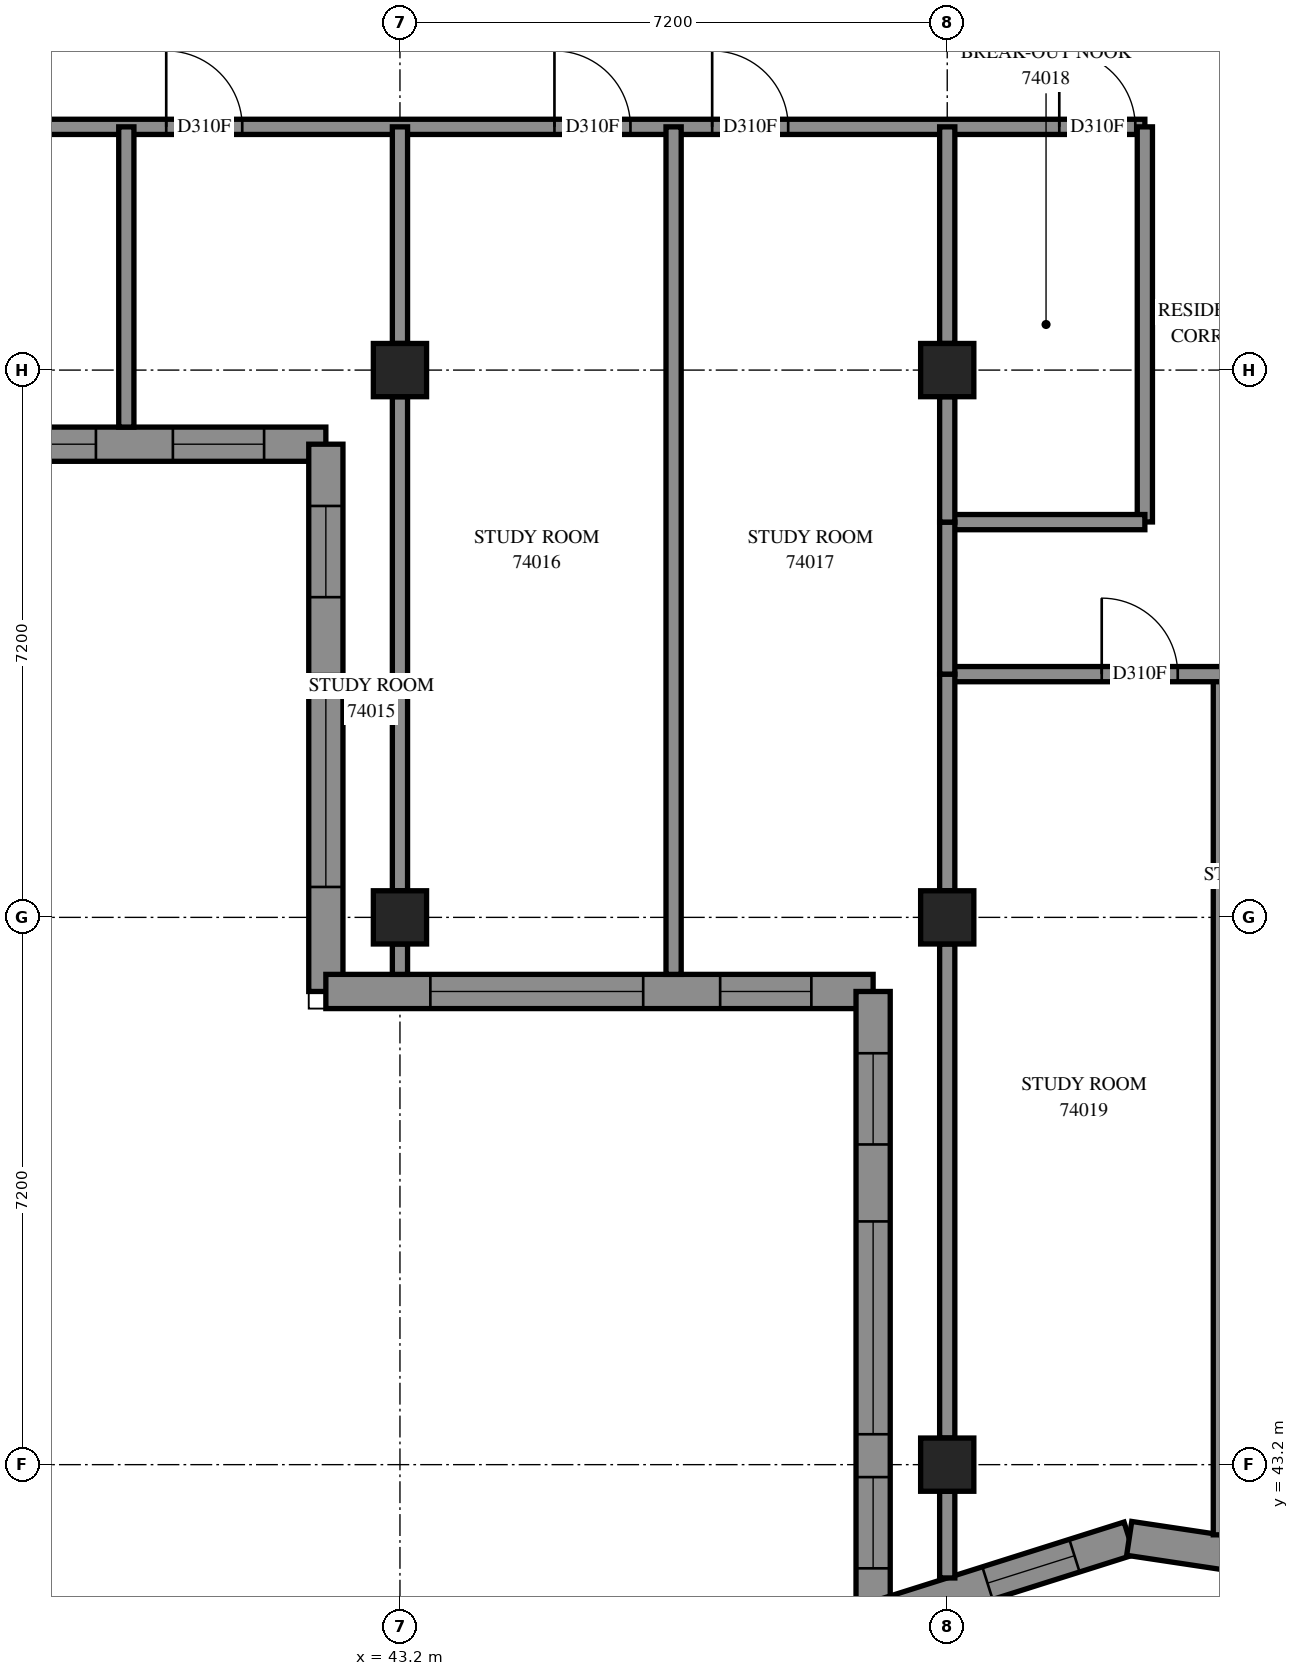
"""IFC4 building model, lengths in metres.
Left out: names, types, materials, properties, quantities, classifications, styles, units other than length and angle.
Written with IfcOpenShell. Run it as: python <this file> out.ifc"""

import sys

from ifc_helpers import new_model, si_unit, direction, frame, frame_2d, origin, origin_2d, place, context, subcontext, project, spatial, polyline, rectangle, outline, extrude, element, fill, save


model = new_model("IFC4")
c1 = context("Model", 3, precision=1e-05, world=origin(), true_north=direction((0.0, 1.0)))
c2 = subcontext(c1, "Body", "Model", "MODEL_VIEW")
j1 = project(units=[si_unit("LENGTHUNIT", "METRE"), si_unit("PLANEANGLEUNIT", "RADIAN")], contexts=[c1])
p1 = place(None, origin())
s1 = spatial("IfcSite", under=j1, at=p1, CompositionType="ELEMENT")
p2 = place(p1, origin())
s2 = spatial("IfcBuilding", under=s1, at=p2, CompositionType="ELEMENT")
p3 = place(p2, frame((0.0, 0.0, 271.0)))
s3 = spatial("IfcBuildingStorey", under=s2, at=p3, CompositionType="ELEMENT", Elevation=271.0)
for number, where, z_axis, x_axis in (
    (1, (43.2, 50.4, 0.0), (0.0, 0.0, 1.0), (1.0, 0.0, 0.0)),
    (2, (43.2, 57.6, 0.0), (0.0, 0.0, 1.0), (1.0, 0.0, 0.0)),
    (3, (50.4, 43.2, 0.0), (0.0, 0.0, 1.0), (1.0, 0.0, 0.0)),
    (4, (50.4, 50.4, 0.0), (0.0, 0.0, 1.0), (1.0, 0.0, 0.0)),
    (5, (50.4, 57.6, 0.0), (0.0, 0.0, 1.0), (1.0, 0.0, 0.0)),
):
    element("IfcColumn", number, at=place(p3, frame(where, z_axis=z_axis, x_axis=x_axis)), inside=s3, PredefinedType="COLUMN", context=c2, shape_type="SweptSolid", body=[
        extrude(rectangle(XDim=0.7, YDim=0.7, at=origin_2d()), origin(), (0.0, 0.0, 1.0), 3.1),
    ])
p4 = place(p3, frame((35.025, 56.625, 0.0), z_axis=(0.0, 0.0, 1.0), x_axis=(1.0, 0.0, 0.0)))
e6 = element("IfcWall", 6, at=p4, inside=s3, PredefinedType="SOLIDWALL", context=c2, shape_type="SweptSolid", body=[
    extrude(outline(polyline([(-0.225, -0.225), (6.975, -0.225), (7.425, 0.225), (0.225, 0.225), (-0.225, -0.225)])), origin(), (0.0, 0.0, 1.0), 3.1),
])
p5 = place(p4, frame((1.375, 0.0, 0.45)))
e7 = element("IfcOpeningElement", 7, at=p5, cuts=e6, PredefinedType="OPENING", context=c2, shape_type="SweptSolid", body=[
    extrude(rectangle(XDim=2.8, YDim=2.55, at=frame_2d((1.4, 1.275))), frame((0.0, 0.235, 0.0), z_axis=(0.0, -1.0, 0.0), x_axis=(1.0, 0.0, 0.0)), (0.0, 0.0, 1.0), 0.47),
])
p6 = place(p4, frame((5.188, 0.0, 0.45)))
e8 = element("IfcOpeningElement", 8, at=p6, cuts=e6, PredefinedType="OPENING", context=c2, shape_type="SweptSolid", body=[
    extrude(rectangle(XDim=1.2, YDim=2.55, at=frame_2d((0.6, 1.275))), frame((0.0, 0.235, 0.0), z_axis=(0.0, -1.0, 0.0), x_axis=(1.0, 0.0, 0.0)), (0.0, 0.0, 1.0), 0.47),
])
p7 = place(p3, frame((42.225, 56.625, 0.0), z_axis=(0.0, 0.0, 1.0), x_axis=(0.0, -1.0, 0.0)))
e9 = element("IfcWall", 9, at=p7, inside=s3, PredefinedType="SOLIDWALL", context=c2, shape_type="SweptSolid", body=[
    extrude(outline(polyline([(0.225, -0.225), (7.425, -0.225), (6.975, 0.225), (-0.225, 0.225), (0.225, -0.225)])), origin(), (0.0, 0.0, 1.0), 3.1),
])
p8 = place(p7, frame((3.025, 0.0, 0.45)))
e10 = element("IfcOpeningElement", 10, at=p8, cuts=e9, PredefinedType="OPENING", context=c2, shape_type="SweptSolid", body=[
    extrude(rectangle(XDim=2.8, YDim=2.55, at=frame_2d((1.4, 1.275))), frame((0.0, 0.235, 0.0), z_axis=(0.0, -1.0, 0.0), x_axis=(1.0, 0.0, 0.0)), (0.0, 0.0, 1.0), 0.47),
])
p9 = place(p7, frame((0.812, 0.0, 0.45)))
e11 = element("IfcOpeningElement", 11, at=p9, cuts=e9, PredefinedType="OPENING", context=c2, shape_type="SweptSolid", body=[
    extrude(rectangle(XDim=1.2, YDim=2.55, at=frame_2d((0.6, 1.275))), frame((0.0, 0.235, 0.0), z_axis=(0.0, -1.0, 0.0), x_axis=(1.0, 0.0, 0.0)), (0.0, 0.0, 1.0), 0.47),
])
p10 = place(p3, frame((42.225, 49.425, 0.0), z_axis=(0.0, 0.0, 1.0), x_axis=(1.0, 0.0, 0.0)))
e12 = element("IfcWall", 12, at=p10, inside=s3, PredefinedType="SOLIDWALL", context=c2, shape_type="SweptSolid", body=[
    extrude(outline(polyline([(-0.225, -0.225), (6.975, -0.225), (7.425, 0.225), (0.225, 0.225), (-0.225, -0.225)])), origin(), (0.0, 0.0, 1.0), 3.1),
])
p11 = place(p10, frame((1.375, 0.0, 0.45)))
e13 = element("IfcOpeningElement", 13, at=p11, cuts=e12, PredefinedType="OPENING", context=c2, shape_type="SweptSolid", body=[
    extrude(rectangle(XDim=2.8, YDim=2.55, at=frame_2d((1.4, 1.275))), frame((0.0, 0.235, 0.0), z_axis=(0.0, -1.0, 0.0), x_axis=(1.0, 0.0, 0.0)), (0.0, 0.0, 1.0), 0.47),
])
p12 = place(p10, frame((5.188, 0.0, 0.45)))
e14 = element("IfcOpeningElement", 14, at=p12, cuts=e12, PredefinedType="OPENING", context=c2, shape_type="SweptSolid", body=[
    extrude(rectangle(XDim=1.2, YDim=2.55, at=frame_2d((0.6, 1.275))), frame((0.0, 0.235, 0.0), z_axis=(0.0, -1.0, 0.0), x_axis=(1.0, 0.0, 0.0)), (0.0, 0.0, 1.0), 0.47),
])
p13 = place(p3, frame((49.425, 49.425, 0.0), z_axis=(0.0, 0.0, 1.0), x_axis=(0.0, -1.0, 0.0)))
e15 = element("IfcWall", 15, at=p13, inside=s3, PredefinedType="SOLIDWALL", context=c2, shape_type="SweptSolid", body=[
    extrude(outline(polyline([(0.225, -0.225), (8.567, -0.225), (7.953, 0.225), (-0.225, 0.225), (0.225, -0.225)])), origin(), (0.0, 0.0, 1.0), 3.1),
])
p14 = place(p13, frame((3.025, 0.0, 0.45)))
e16 = element("IfcOpeningElement", 16, at=p14, cuts=e15, PredefinedType="OPENING", context=c2, shape_type="SweptSolid", body=[
    extrude(rectangle(XDim=2.8, YDim=2.55, at=frame_2d((1.4, 1.275))), frame((0.0, 0.235, 0.0), z_axis=(0.0, -1.0, 0.0), x_axis=(1.0, 0.0, 0.0)), (0.0, 0.0, 1.0), 0.47),
])
p15 = place(p13, frame((0.812, 0.0, 0.45)))
e17 = element("IfcOpeningElement", 17, at=p15, cuts=e15, PredefinedType="OPENING", context=c2, shape_type="SweptSolid", body=[
    extrude(rectangle(XDim=1.2, YDim=2.55, at=frame_2d((0.6, 1.275))), frame((0.0, 0.235, 0.0), z_axis=(0.0, -1.0, 0.0), x_axis=(1.0, 0.0, 0.0)), (0.0, 0.0, 1.0), 0.47),
])
p16 = place(p13, frame((6.389, 0.0, 0.45)))
e18 = element("IfcOpeningElement", 18, at=p16, cuts=e15, PredefinedType="OPENING", context=c2, shape_type="SweptSolid", body=[
    extrude(rectangle(XDim=1.2, YDim=2.55, at=frame_2d((0.6, 1.275))), frame((0.0, 0.235, 0.0), z_axis=(0.0, -1.0, 0.0), x_axis=(1.0, 0.0, 0.0)), (0.0, 0.0, 1.0), 0.47),
])
p17 = place(p3, frame((49.425, 41.165, 0.0), z_axis=(0.0, 0.0, 1.0), x_axis=(0.9534872353, 0.3014333959, 0.0)))
e19 = element("IfcWall", 19, at=p17, inside=s3, PredefinedType="SOLIDWALL", context=c2, shape_type="SweptSolid", body=[
    extrude(outline(polyline([(-0.307, -0.225), (3.481, -0.225), (3.586, 0.225), (0.307, 0.225), (-0.307, -0.225)])), origin(), (0.0, 0.0, 1.0), 3.1),
])
p18 = place(p17, frame((1.578, 0.0, 0.45)))
e20 = element("IfcOpeningElement", 20, at=p18, cuts=e19, PredefinedType="OPENING", context=c2, shape_type="SweptSolid", body=[
    extrude(rectangle(XDim=1.2, YDim=2.55, at=frame_2d((0.6, 1.275))), frame((0.0, 0.235, 0.0), z_axis=(0.0, -1.0, 0.0), x_axis=(1.0, 0.0, 0.0)), (0.0, 0.0, 1.0), 0.47),
])
p19 = place(p3, frame((52.794, 42.23, 0.0), z_axis=(0.0, 0.0, 1.0), x_axis=(0.9889307576, -0.14837775, 0.0)))
e21 = element("IfcWall", 21, at=p19, inside=s3, PredefinedType="SOLIDWALL", context=c2, shape_type="SweptSolid", body=[
    extrude(outline(polyline([(0.052, -0.225), (3.705, -0.225), (3.637, 0.225), (-0.052, 0.225), (0.052, -0.225)])), origin(), (0.0, 0.0, 1.0), 3.1),
])
p20 = place(p19, frame((1.728, 0.0, 0.45)))
e22 = element("IfcOpeningElement", 22, at=p20, cuts=e21, PredefinedType="OPENING", context=c2, shape_type="SweptSolid", body=[
    extrude(rectangle(XDim=1.2, YDim=2.55, at=frame_2d((0.6, 1.275))), frame((0.0, 0.235, 0.0), z_axis=(0.0, -1.0, 0.0), x_axis=(1.0, 0.0, 0.0)), (0.0, 0.0, 1.0), 0.47),
])
p21 = place(p3, frame((36.002, 60.8, 0.0), z_axis=(0.0, 0.0, 1.0), x_axis=(1.0, 0.0, 0.0)))
e23 = element("IfcWall", 23, at=p21, inside=s3, PredefinedType="PARTITIONING", context=c2, shape_type="SweptSolid", body=[
    extrude(rectangle(XDim=16.998, YDim=0.2, at=frame_2d((8.499, 0.0))), origin(), (0.0, 0.0, 1.0), 3.1),
])
p22 = place(p21, frame((4.123, 0.0, 0.0)))
e24 = element("IfcOpeningElement", 24, at=p22, cuts=e23, PredefinedType="OPENING", context=c2, shape_type="SweptSolid", body=[
    extrude(rectangle(XDim=1.0, YDim=2.1, at=frame_2d((0.5, 1.05))), frame((0.0, 0.11, 0.0), z_axis=(0.0, -1.0, 0.0), x_axis=(1.0, 0.0, 0.0)), (0.0, 0.0, 1.0), 0.22),
])
p23 = place(p21, frame((9.23, 0.0, 0.0)))
e25 = element("IfcOpeningElement", 25, at=p23, cuts=e23, PredefinedType="OPENING", context=c2, shape_type="SweptSolid", body=[
    extrude(rectangle(XDim=1.0, YDim=2.1, at=frame_2d((0.5, 1.05))), frame((0.0, 0.11, 0.0), z_axis=(0.0, -1.0, 0.0), x_axis=(1.0, 0.0, 0.0)), (0.0, 0.0, 1.0), 0.22),
])
p24 = place(p21, frame((11.306, 0.0, 0.0)))
e26 = element("IfcOpeningElement", 26, at=p24, cuts=e23, PredefinedType="OPENING", context=c2, shape_type="SweptSolid", body=[
    extrude(rectangle(XDim=1.0, YDim=2.1, at=frame_2d((0.5, 1.05))), frame((0.0, 0.11, 0.0), z_axis=(0.0, -1.0, 0.0), x_axis=(1.0, 0.0, 0.0)), (0.0, 0.0, 1.0), 0.22),
])
p25 = place(p21, frame((15.872, 0.0, 0.0)))
e27 = element("IfcOpeningElement", 27, at=p25, cuts=e23, PredefinedType="OPENING", context=c2, shape_type="SweptSolid", body=[
    extrude(rectangle(XDim=1.0, YDim=2.1, at=frame_2d((0.5, 1.05))), frame((0.0, 0.11, 0.0), z_axis=(0.0, -1.0, 0.0), x_axis=(1.0, 0.0, 0.0)), (0.0, 0.0, 1.0), 0.22),
])
p26 = place(p3, frame((54.0, 42.277, 0.0), z_axis=(0.0, 0.0, 1.0), x_axis=(0.0, 1.0, 0.0)))
e28 = element("IfcWall", 28, at=p26, inside=s3, PredefinedType="PARTITIONING", context=c2, shape_type="SweptSolid", body=[
    extrude(rectangle(XDim=11.323, YDim=0.2, at=frame_2d((5.662, 0.0))), origin(), (0.0, 0.0, 1.0), 3.1),
])
p27 = place(p3, frame((46.8, 49.65, 0.0), z_axis=(0.0, 0.0, 1.0), x_axis=(0.0, 1.0, 0.0)))
e29 = element("IfcWall", 29, at=p27, inside=s3, PredefinedType="PARTITIONING", context=c2, shape_type="SweptSolid", body=[
    extrude(rectangle(XDim=11.15, YDim=0.2, at=frame_2d((5.575, 0.0))), origin(), (0.0, 0.0, 1.0), 3.1),
])
for number, where, z_axis, x_axis in (
    (30, (43.2, 50.75, 0.0), (0.0, 0.0, 1.0), (0.0, 1.0, 0.0)),
    (31, (50.4, 43.55, 0.0), (0.0, 0.0, 1.0), (0.0, 1.0, 0.0)),
):
    element("IfcWall", number, at=place(p3, frame(where, z_axis=z_axis, x_axis=x_axis)), inside=s3, PredefinedType="PARTITIONING", context=c2, shape_type="SweptSolid", body=[
        extrude(rectangle(XDim=6.5, YDim=0.2, at=frame_2d((3.25, 0.0))), origin(), (0.0, 0.0, 1.0), 2.6),
    ])
p28 = place(p3, frame((53.0, 55.602, 0.0), z_axis=(0.0, 0.0, 1.0), x_axis=(0.0, 1.0, 0.0)))
e32 = element("IfcWall", 32, at=p28, inside=s3, PredefinedType="PARTITIONING", context=c2, shape_type="SweptSolid", body=[
    extrude(rectangle(XDim=5.198, YDim=0.2, at=frame_2d((2.599, 0.0))), origin(), (0.0, 0.0, 1.0), 3.1),
])
p29 = place(p3, frame((50.4, 53.6, 0.0), z_axis=(0.0, 0.0, 1.0), x_axis=(1.0, 0.0, 0.0)))
e33 = element("IfcWall", 33, at=p29, inside=s3, PredefinedType="PARTITIONING", context=c2, shape_type="SweptSolid", body=[
    extrude(rectangle(XDim=4.8, YDim=0.2, at=frame_2d((2.4, 0.0))), origin(), (0.0, 0.0, 1.0), 3.1),
])
p30 = place(p29, frame((2.033, 0.0, 0.0)))
e34 = element("IfcOpeningElement", 34, at=p30, cuts=e33, PredefinedType="OPENING", context=c2, shape_type="SweptSolid", body=[
    extrude(rectangle(XDim=1.0, YDim=2.1, at=frame_2d((0.5, 1.05))), frame((0.0, 0.11, 0.0), z_axis=(0.0, -1.0, 0.0), x_axis=(1.0, 0.0, 0.0)), (0.0, 0.0, 1.0), 0.22),
])
p31 = place(p3, frame((39.6, 56.85, 0.0), z_axis=(0.0, 0.0, 1.0), x_axis=(0.0, 1.0, 0.0)))
e35 = element("IfcWall", 35, at=p31, inside=s3, PredefinedType="PARTITIONING", context=c2, shape_type="SweptSolid", body=[
    extrude(rectangle(XDim=3.95, YDim=0.2, at=frame_2d((1.975, 0.0))), origin(), (0.0, 0.0, 1.0), 3.1),
])
for number, where, z_axis, x_axis in (
    (36, (50.4, 50.75, 0.0), (0.0, 0.0, 1.0), (0.0, 1.0, 0.0)),
    (37, (43.2, 57.95, 0.0), (0.0, 0.0, 1.0), (0.0, 1.0, 0.0)),
    (38, (50.4, 57.95, 0.0), (0.0, 0.0, 1.0), (0.0, 1.0, 0.0)),
):
    element("IfcWall", number, at=place(p3, frame(where, z_axis=z_axis, x_axis=x_axis)), inside=s3, PredefinedType="PARTITIONING", context=c2, shape_type="SweptSolid", body=[
        extrude(rectangle(XDim=2.85, YDim=0.2, at=frame_2d((1.425, 0.0))), origin(), (0.0, 0.0, 1.0), 3.1),
    ])
p32 = place(p3, frame((50.4, 55.6, 0.0), z_axis=(0.0, 0.0, 1.0), x_axis=(1.0, 0.0, 0.0)))
e39 = element("IfcWall", 39, at=p32, inside=s3, PredefinedType="PARTITIONING", context=c2, shape_type="SweptSolid", body=[
    extrude(rectangle(XDim=2.6, YDim=0.2, at=frame_2d((1.3, 0.0))), origin(), (0.0, 0.0, 1.0), 3.1),
])
p33 = place(p3, frame((50.4, 53.6, 0.0), z_axis=(0.0, 0.0, 1.0), x_axis=(0.0, 1.0, 0.0)))
e40 = element("IfcWall", 40, at=p33, inside=s3, PredefinedType="PARTITIONING", context=c2, shape_type="SweptSolid", body=[
    extrude(rectangle(XDim=2.0, YDim=0.2, at=frame_2d((1.0, 0.0))), origin(), (0.0, 0.0, 1.0), 3.1),
])
p34 = place(p3, frame((50.4, 55.6, 0.0), z_axis=(0.0, 0.0, 1.0), x_axis=(0.0, 1.0, 0.0)))
e41 = element("IfcWall", 41, at=p34, inside=s3, PredefinedType="PARTITIONING", context=c2, shape_type="SweptSolid", body=[
    extrude(rectangle(XDim=1.65, YDim=0.2, at=frame_2d((0.825, 0.0))), origin(), (0.0, 0.0, 1.0), 3.1),
])
p35 = place(p3, frame((50.4, 41.709, 0.0), z_axis=(0.0, 0.0, 1.0), x_axis=(0.0, 1.0, 0.0)))
e42 = element("IfcWall", 42, at=p35, inside=s3, PredefinedType="PARTITIONING", context=c2, shape_type="SweptSolid", body=[
    extrude(rectangle(XDim=1.141, YDim=0.2, at=frame_2d((0.57, 0.0))), origin(), (0.0, 0.0, 1.0), 3.1),
])
p36 = place(p3, frame((43.2, 49.65, 0.0), z_axis=(0.0, 0.0, 1.0), x_axis=(0.0, 1.0, 0.0)))
e43 = element("IfcWall", 43, at=p36, inside=s3, PredefinedType="PARTITIONING", context=c2, shape_type="SweptSolid", body=[
    extrude(rectangle(XDim=0.4, YDim=0.2, at=frame_2d((0.2, 0.0))), origin(), (0.0, 0.0, 1.0), 3.1),
])
p37 = place(p5, origin())
e44 = element("IfcWindow", 44, at=p37, inside=s3, PartitioningType="SINGLE_PANEL", PredefinedType="WINDOW", context=c2, shape_type="SweptSolid", body=[
    extrude(rectangle(XDim=2.8, YDim=2.55, at=frame_2d((1.4, 1.275))), frame((0.0, 0.205, 0.0), z_axis=(0.0, -1.0, 0.0), x_axis=(1.0, 0.0, 0.0)), (0.0, 0.0, 1.0), 0.06),
])
fill(e7, e44)
p38 = place(p6, origin())
e45 = element("IfcWindow", 45, at=p38, inside=s3, PartitioningType="SINGLE_PANEL", PredefinedType="WINDOW", context=c2, shape_type="SweptSolid", body=[
    extrude(rectangle(XDim=1.2, YDim=2.55, at=frame_2d((0.6, 1.275))), frame((0.0, 0.205, 0.0), z_axis=(0.0, -1.0, 0.0), x_axis=(1.0, 0.0, 0.0)), (0.0, 0.0, 1.0), 0.06),
])
fill(e8, e45)
p39 = place(p8, origin())
e46 = element("IfcWindow", 46, at=p39, inside=s3, PartitioningType="SINGLE_PANEL", PredefinedType="WINDOW", context=c2, shape_type="SweptSolid", body=[
    extrude(rectangle(XDim=2.8, YDim=2.55, at=frame_2d((1.4, 1.275))), frame((0.0, 0.205, 0.0), z_axis=(0.0, -1.0, 0.0), x_axis=(1.0, 0.0, 0.0)), (0.0, 0.0, 1.0), 0.06),
])
fill(e10, e46)
p40 = place(p9, origin())
e47 = element("IfcWindow", 47, at=p40, inside=s3, PartitioningType="SINGLE_PANEL", PredefinedType="WINDOW", context=c2, shape_type="SweptSolid", body=[
    extrude(rectangle(XDim=1.2, YDim=2.55, at=frame_2d((0.6, 1.275))), frame((0.0, 0.205, 0.0), z_axis=(0.0, -1.0, 0.0), x_axis=(1.0, 0.0, 0.0)), (0.0, 0.0, 1.0), 0.06),
])
fill(e11, e47)
p41 = place(p11, origin())
e48 = element("IfcWindow", 48, at=p41, inside=s3, PartitioningType="SINGLE_PANEL", PredefinedType="WINDOW", context=c2, shape_type="SweptSolid", body=[
    extrude(rectangle(XDim=2.8, YDim=2.55, at=frame_2d((1.4, 1.275))), frame((0.0, 0.205, 0.0), z_axis=(0.0, -1.0, 0.0), x_axis=(1.0, 0.0, 0.0)), (0.0, 0.0, 1.0), 0.06),
])
fill(e13, e48)
p42 = place(p12, origin())
e49 = element("IfcWindow", 49, at=p42, inside=s3, PartitioningType="SINGLE_PANEL", PredefinedType="WINDOW", context=c2, shape_type="SweptSolid", body=[
    extrude(rectangle(XDim=1.2, YDim=2.55, at=frame_2d((0.6, 1.275))), frame((0.0, 0.205, 0.0), z_axis=(0.0, -1.0, 0.0), x_axis=(1.0, 0.0, 0.0)), (0.0, 0.0, 1.0), 0.06),
])
fill(e14, e49)
p43 = place(p14, origin())
e50 = element("IfcWindow", 50, at=p43, inside=s3, PartitioningType="SINGLE_PANEL", PredefinedType="WINDOW", context=c2, shape_type="SweptSolid", body=[
    extrude(rectangle(XDim=2.8, YDim=2.55, at=frame_2d((1.4, 1.275))), frame((0.0, 0.205, 0.0), z_axis=(0.0, -1.0, 0.0), x_axis=(1.0, 0.0, 0.0)), (0.0, 0.0, 1.0), 0.06),
])
fill(e16, e50)
p44 = place(p15, origin())
e51 = element("IfcWindow", 51, at=p44, inside=s3, PartitioningType="SINGLE_PANEL", PredefinedType="WINDOW", context=c2, shape_type="SweptSolid", body=[
    extrude(rectangle(XDim=1.2, YDim=2.55, at=frame_2d((0.6, 1.275))), frame((0.0, 0.205, 0.0), z_axis=(0.0, -1.0, 0.0), x_axis=(1.0, 0.0, 0.0)), (0.0, 0.0, 1.0), 0.06),
])
fill(e17, e51)
p45 = place(p16, origin())
e52 = element("IfcWindow", 52, at=p45, inside=s3, PartitioningType="SINGLE_PANEL", PredefinedType="WINDOW", context=c2, shape_type="SweptSolid", body=[
    extrude(rectangle(XDim=1.2, YDim=2.55, at=frame_2d((0.6, 1.275))), frame((0.0, 0.205, 0.0), z_axis=(0.0, -1.0, 0.0), x_axis=(1.0, 0.0, 0.0)), (0.0, 0.0, 1.0), 0.06),
])
fill(e18, e52)
p46 = place(p18, origin())
e53 = element("IfcWindow", 53, at=p46, inside=s3, PartitioningType="SINGLE_PANEL", PredefinedType="WINDOW", context=c2, shape_type="SweptSolid", body=[
    extrude(rectangle(XDim=1.2, YDim=2.55, at=frame_2d((0.6, 1.275))), frame((0.0, 0.205, 0.0), z_axis=(0.0, -1.0, 0.0), x_axis=(1.0, 0.0, 0.0)), (0.0, 0.0, 1.0), 0.06),
])
fill(e20, e53)
p47 = place(p22, origin())
e54 = element("IfcDoor", 54, at=p47, inside=s3, OperationType="SINGLE_SWING_RIGHT", PredefinedType="DOOR", context=c2, shape_type="SweptSolid", body=[
    extrude(rectangle(XDim=1.0, YDim=2.1, at=frame_2d((0.5, 1.05))), frame((0.0, 0.025, 0.0), z_axis=(0.0, -1.0, 0.0), x_axis=(1.0, 0.0, 0.0)), (0.0, 0.0, 1.0), 0.05),
])
fill(e24, e54)
p48 = place(p23, origin())
e55 = element("IfcDoor", 55, at=p48, inside=s3, OperationType="SINGLE_SWING_LEFT", PredefinedType="DOOR", context=c2, shape_type="SweptSolid", body=[
    extrude(rectangle(XDim=1.0, YDim=2.1, at=frame_2d((0.5, 1.05))), frame((0.0, 0.025, 0.0), z_axis=(0.0, -1.0, 0.0), x_axis=(1.0, 0.0, 0.0)), (0.0, 0.0, 1.0), 0.05),
])
fill(e25, e55)
p49 = place(p24, origin())
e56 = element("IfcDoor", 56, at=p49, inside=s3, OperationType="SINGLE_SWING_RIGHT", PredefinedType="DOOR", context=c2, shape_type="SweptSolid", body=[
    extrude(rectangle(XDim=1.0, YDim=2.1, at=frame_2d((0.5, 1.05))), frame((0.0, 0.025, 0.0), z_axis=(0.0, -1.0, 0.0), x_axis=(1.0, 0.0, 0.0)), (0.0, 0.0, 1.0), 0.05),
])
fill(e26, e56)
p50 = place(p25, origin())
e57 = element("IfcDoor", 57, at=p50, inside=s3, OperationType="SINGLE_SWING_LEFT", PredefinedType="DOOR", context=c2, shape_type="SweptSolid", body=[
    extrude(rectangle(XDim=1.0, YDim=2.1, at=frame_2d((0.5, 1.05))), frame((0.0, 0.025, 0.0), z_axis=(0.0, -1.0, 0.0), x_axis=(1.0, 0.0, 0.0)), (0.0, 0.0, 1.0), 0.05),
])
fill(e27, e57)
p51 = place(p30, origin())
e58 = element("IfcDoor", 58, at=p51, inside=s3, OperationType="SINGLE_SWING_LEFT", PredefinedType="DOOR", context=c2, shape_type="SweptSolid", body=[
    extrude(rectangle(XDim=1.0, YDim=2.1, at=frame_2d((0.5, 1.05))), frame((0.0, 0.025, 0.0), z_axis=(0.0, -1.0, 0.0), x_axis=(1.0, 0.0, 0.0)), (0.0, 0.0, 1.0), 0.05),
])
fill(e34, e58)
save(model, sys.argv[1])
